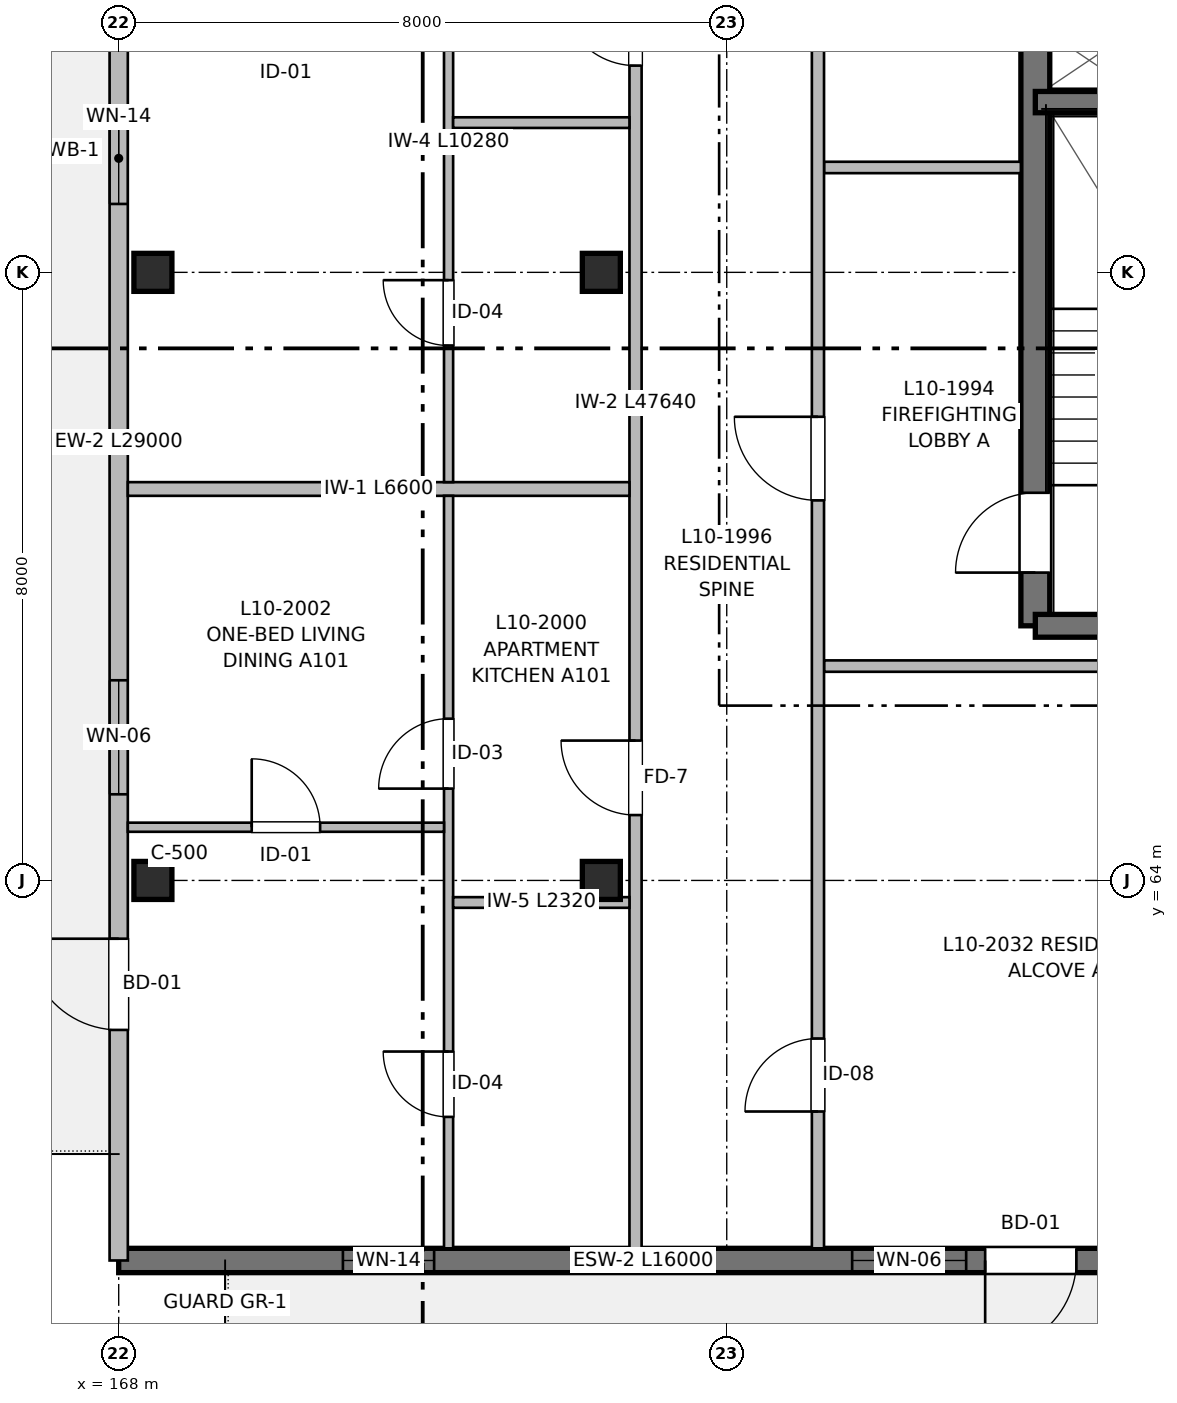
"""IFC4 building model, lengths in metres.
Left out: names, types, materials, properties, quantities, classifications, styles, units other than length and angle.
Written with IfcOpenShell. Run it as: python <this file> out.ifc"""

import sys

from ifc_helpers import new_model, si_unit, direction, frame, frame_2d, origin, origin_2d, place, context, subcontext, project, spatial, rectangle, extrude, element, fill, save


model = new_model("IFC4")
c1 = context("Model", 3, precision=1e-05, world=origin(), true_north=direction((0.0, 1.0)))
c2 = subcontext(c1, "Body", "Model", "MODEL_VIEW")
j1 = project(units=[si_unit("LENGTHUNIT", "METRE"), si_unit("PLANEANGLEUNIT", "RADIAN")], contexts=[c1])
p1 = place(None, origin())
s1 = spatial("IfcSite", under=j1, at=p1, CompositionType="ELEMENT")
p2 = place(p1, origin())
s2 = spatial("IfcBuilding", under=s1, at=p2, CompositionType="ELEMENT")
p3 = place(p2, frame((0.0, 0.0, 32.96)))
s3 = spatial("IfcBuildingStorey", under=s2, at=p3, CompositionType="ELEMENT", Elevation=32.96)
for number, where, z_axis, x_axis in (
    (1, (168.45, 64.0, 0.0), (0.0, 0.0, 1.0), (1.0, 0.0, 0.0)),
    (2, (168.45, 72.0, 0.0), (0.0, 0.0, 1.0), (1.0, 0.0, 0.0)),
    (3, (174.35, 64.0, 0.0), (0.0, 0.0, 1.0), (1.0, 0.0, 0.0)),
    (4, (174.35, 72.0, 0.0), (0.0, 0.0, 1.0), (1.0, 0.0, 0.0)),
):
    element("IfcColumn", number, at=place(p3, frame(where, z_axis=z_axis, x_axis=x_axis)), inside=s3, PredefinedType="COLUMN", context=c2, shape_type="SweptSolid", body=[
        extrude(rectangle(XDim=0.5, YDim=0.5, at=origin_2d()), origin(), (0.0, 0.0, 1.0), 3.2),
    ])
p4 = place(p3, frame((180.06, 67.35, 0.0), z_axis=(0.0, 0.0, 1.0), x_axis=(0.0, 1.0, 0.0)))
e5 = element("IfcWall", 5, at=p4, inside=s3, PredefinedType="SHEAR", context=c2, shape_type="SweptSolid", body=[
    extrude(rectangle(XDim=13.15, YDim=0.38, at=frame_2d((6.575, 0.0))), origin(), (0.0, 0.0, 1.0), 3.2),
])
p5 = place(p4, frame((0.7, 0.0, 0.0)))
e6 = element("IfcOpeningElement", 6, at=p5, cuts=e5, PredefinedType="OPENING", context=c2, shape_type="SweptSolid", body=[
    extrude(rectangle(XDim=1.05, YDim=2.15, at=frame_2d((0.525, 1.075))), frame((0.0, 0.2, 0.0), z_axis=(0.0, -1.0, 0.0), x_axis=(1.0, 0.0, 0.0)), (0.0, 0.0, 1.0), 0.4),
])
p6 = place(p3, frame((183.47, 67.35, 0.0), z_axis=(0.0, 0.0, 1.0), x_axis=(-1.0, 0.0, 0.0)))
e7 = element("IfcWall", 7, at=p6, inside=s3, PredefinedType="SHEAR", context=c2, shape_type="SweptSolid", body=[
    extrude(rectangle(XDim=3.41, YDim=0.3, at=frame_2d((1.705, 0.0))), origin(), (0.0, 0.0, 1.0), 3.2),
])
p7 = place(p3, frame((180.06, 74.24, 0.0), z_axis=(0.0, 0.0, 1.0), x_axis=(1.0, 0.0, 0.0)))
e8 = element("IfcWall", 8, at=p7, inside=s3, PredefinedType="SHEAR", context=c2, shape_type="SweptSolid", body=[
    extrude(rectangle(XDim=3.41, YDim=0.28, at=frame_2d((1.705, 0.0))), origin(), (0.0, 0.0, 1.0), 3.2),
])
p8 = place(p3, frame((184.0, 59.0, 0.0), z_axis=(0.0, 0.0, 1.0), x_axis=(-1.0, 0.0, 0.0)))
e9 = element("IfcWall", 9, at=p8, inside=s3, PredefinedType="SHEAR", context=c2, shape_type="SweptSolid", body=[
    extrude(rectangle(XDim=16.0, YDim=0.32, at=frame_2d((8.0, 0.0))), origin(), (0.0, 0.0, 1.0), 2.98),
])
p9 = place(p8, frame((3.4, 0.0, 0.0)))
e10 = element("IfcOpeningElement", 10, at=p9, cuts=e9, PredefinedType="OPENING", context=c2, shape_type="SweptSolid", body=[
    extrude(rectangle(XDim=1.2, YDim=2.2, at=frame_2d((0.6, 1.1))), frame((0.0, 0.17, 0.0), z_axis=(0.0, -1.0, 0.0), x_axis=(1.0, 0.0, 0.0)), (0.0, 0.0, 1.0), 0.34),
])
p10 = place(p8, frame((4.85, 0.0, 0.82)))
e11 = element("IfcOpeningElement", 11, at=p10, cuts=e9, PredefinedType="OPENING", context=c2, shape_type="SweptSolid", body=[
    extrude(rectangle(XDim=1.5, YDim=1.4, at=frame_2d((0.75, 0.7))), frame((0.0, 0.17, 0.0), z_axis=(0.0, -1.0, 0.0), x_axis=(1.0, 0.0, 0.0)), (0.0, 0.0, 1.0), 0.34),
])
p11 = place(p8, frame((11.85, 0.0, 0.9)))
e12 = element("IfcOpeningElement", 12, at=p11, cuts=e9, PredefinedType="OPENING", context=c2, shape_type="SweptSolid", body=[
    extrude(rectangle(XDim=1.2, YDim=1.05, at=frame_2d((0.6, 0.525))), frame((0.0, 0.17, 0.0), z_axis=(0.0, -1.0, 0.0), x_axis=(1.0, 0.0, 0.0)), (0.0, 0.0, 1.0), 0.34),
])
p12 = place(p3, frame((168.0, 59.0, 0.0), z_axis=(0.0, 0.0, 1.0), x_axis=(0.0, 1.0, 0.0)))
e13 = element("IfcWall", 13, at=p12, inside=s3, PredefinedType="SOLIDWALL", context=c2, shape_type="SweptSolid", body=[
    extrude(rectangle(XDim=29.0, YDim=0.24, at=frame_2d((14.5, 0.0))), origin(), (0.0, 0.0, 1.0), 2.98),
])
p13 = place(p12, frame((3.033, 0.0, 0.0)))
e14 = element("IfcOpeningElement", 14, at=p13, cuts=e13, PredefinedType="OPENING", context=c2, shape_type="SweptSolid", body=[
    extrude(rectangle(XDim=1.2, YDim=2.2, at=frame_2d((0.6, 1.1))), frame((0.0, 0.13, 0.0), z_axis=(0.0, -1.0, 0.0), x_axis=(1.0, 0.0, 0.0)), (0.0, 0.0, 1.0), 0.26),
])
p14 = place(p12, frame((6.133, 0.0, 0.82)))
e15 = element("IfcOpeningElement", 15, at=p14, cuts=e13, PredefinedType="OPENING", context=c2, shape_type="SweptSolid", body=[
    extrude(rectangle(XDim=1.5, YDim=1.4, at=frame_2d((0.75, 0.7))), frame((0.0, 0.13, 0.0), z_axis=(0.0, -1.0, 0.0), x_axis=(1.0, 0.0, 0.0)), (0.0, 0.0, 1.0), 0.26),
])
p15 = place(p12, frame((13.9, 0.0, 0.9)))
e16 = element("IfcOpeningElement", 16, at=p15, cuts=e13, PredefinedType="OPENING", context=c2, shape_type="SweptSolid", body=[
    extrude(rectangle(XDim=1.2, YDim=1.05, at=frame_2d((0.6, 0.525))), frame((0.0, 0.13, 0.0), z_axis=(0.0, -1.0, 0.0), x_axis=(1.0, 0.0, 0.0)), (0.0, 0.0, 1.0), 0.26),
])
p16 = place(p12, frame((23.842, 0.0, 0.9)))
e17 = element("IfcOpeningElement", 17, at=p16, cuts=e13, PredefinedType="OPENING", context=c2, shape_type="SweptSolid", body=[
    extrude(rectangle(XDim=0.65, YDim=0.95, at=frame_2d((0.325, 0.475))), frame((0.0, 0.13, 0.0), z_axis=(0.0, -1.0, 0.0), x_axis=(1.0, 0.0, 0.0)), (0.0, 0.0, 1.0), 0.26),
])
p17 = place(p12, frame((17.535, 0.0, 0.82)))
e18 = element("IfcOpeningElement", 18, at=p17, cuts=e13, PredefinedType="OPENING", context=c2, shape_type="SweptSolid", body=[
    extrude(rectangle(XDim=1.5, YDim=1.4, at=frame_2d((0.75, 0.7))), frame((0.0, 0.13, 0.0), z_axis=(0.0, -1.0, 0.0), x_axis=(1.0, 0.0, 0.0)), (0.0, 0.0, 1.0), 0.26),
])
p18 = place(p12, frame((27.875, 0.0, 0.9)))
e19 = element("IfcOpeningElement", 19, at=p18, cuts=e13, PredefinedType="OPENING", context=c2, shape_type="SweptSolid", body=[
    extrude(rectangle(XDim=0.65, YDim=0.95, at=frame_2d((0.325, 0.475))), frame((0.0, 0.13, 0.0), z_axis=(0.0, -1.0, 0.0), x_axis=(1.0, 0.0, 0.0)), (0.0, 0.0, 1.0), 0.26),
])
p19 = place(p3, frame((177.28, 66.82, 0.0), z_axis=(0.0, 0.0, 1.0), x_axis=(1.0, 0.0, 0.0)))
e20 = element("IfcWall", 20, at=p19, inside=s3, PredefinedType="PARTITIONING", context=c2, shape_type="SweptSolid", body=[
    extrude(rectangle(XDim=6.6, YDim=0.15, at=frame_2d((3.3, 0.0))), origin(), (0.0, 0.0, 1.0), 2.935),
])
p20 = place(p3, frame((177.28, 73.38, 0.0), z_axis=(0.0, 0.0, 1.0), x_axis=(1.0, 0.0, 0.0)))
e21 = element("IfcWall", 21, at=p20, inside=s3, PredefinedType="PARTITIONING", context=c2, shape_type="SweptSolid", body=[
    extrude(rectangle(XDim=2.59, YDim=0.15, at=frame_2d((1.295, 0.0))), origin(), (0.0, 0.0, 1.0), 2.935),
])
p21 = place(p3, frame((174.8, 59.16, 0.0), z_axis=(0.0, 0.0, 1.0), x_axis=(0.0, 1.0, 0.0)))
e22 = element("IfcWall", 22, at=p21, inside=s3, PredefinedType="PARTITIONING", context=c2, shape_type="SweptSolid", body=[
    extrude(rectangle(XDim=47.64, YDim=0.16, at=frame_2d((23.82, 0.0))), origin(), (0.0, 0.0, 1.0), 2.935),
])
p22 = place(p21, frame((5.7, 0.0, 0.0)))
e23 = element("IfcOpeningElement", 23, at=p22, cuts=e22, PredefinedType="OPENING", context=c2, shape_type="SweptSolid", body=[
    extrude(rectangle(XDim=0.98, YDim=2.15, at=frame_2d((0.49, 1.075))), frame((0.0, 0.09, 0.0), z_axis=(0.0, -1.0, 0.0), x_axis=(1.0, 0.0, 0.0)), (0.0, 0.0, 1.0), 0.18),
])
p23 = place(p21, frame((15.56, 0.0, 0.0)))
e24 = element("IfcOpeningElement", 24, at=p23, cuts=e22, PredefinedType="OPENING", context=c2, shape_type="SweptSolid", body=[
    extrude(rectangle(XDim=0.98, YDim=2.15, at=frame_2d((0.49, 1.075))), frame((0.0, 0.09, 0.0), z_axis=(0.0, -1.0, 0.0), x_axis=(1.0, 0.0, 0.0)), (0.0, 0.0, 1.0), 0.18),
])
p24 = place(p21, frame((26.9, 0.0, 0.0)))
e25 = element("IfcOpeningElement", 25, at=p24, cuts=e22, PredefinedType="OPENING", context=c2, shape_type="SweptSolid", body=[
    extrude(rectangle(XDim=0.98, YDim=2.15, at=frame_2d((0.49, 1.075))), frame((0.0, 0.09, 0.0), z_axis=(0.0, -1.0, 0.0), x_axis=(1.0, 0.0, 0.0)), (0.0, 0.0, 1.0), 0.18),
])
p25 = place(p21, frame((40.4, 0.0, 0.0)))
e26 = element("IfcOpeningElement", 26, at=p25, cuts=e22, PredefinedType="OPENING", context=c2, shape_type="SweptSolid", body=[
    extrude(rectangle(XDim=0.98, YDim=2.15, at=frame_2d((0.49, 1.075))), frame((0.0, 0.09, 0.0), z_axis=(0.0, -1.0, 0.0), x_axis=(1.0, 0.0, 0.0)), (0.0, 0.0, 1.0), 0.18),
])
p26 = place(p3, frame((177.2, 59.16, 0.0), z_axis=(0.0, 0.0, 1.0), x_axis=(0.0, 1.0, 0.0)))
e27 = element("IfcWall", 27, at=p26, inside=s3, PredefinedType="PARTITIONING", context=c2, shape_type="SweptSolid", body=[
    extrude(rectangle(XDim=47.64, YDim=0.16, at=frame_2d((23.82, 0.0))), origin(), (0.0, 0.0, 1.0), 2.935),
])
p27 = place(p26, frame((9.84, 0.0, 0.0)))
e28 = element("IfcOpeningElement", 28, at=p27, cuts=e27, PredefinedType="OPENING", context=c2, shape_type="SweptSolid", body=[
    extrude(rectangle(XDim=1.1, YDim=2.15, at=frame_2d((0.55, 1.075))), frame((0.0, 0.09, 0.0), z_axis=(0.0, -1.0, 0.0), x_axis=(1.0, 0.0, 0.0)), (0.0, 0.0, 1.0), 0.18),
])
p28 = place(p26, frame((16.24, 0.0, 0.0)))
e29 = element("IfcOpeningElement", 29, at=p28, cuts=e27, PredefinedType="OPENING", context=c2, shape_type="SweptSolid", body=[
    extrude(rectangle(XDim=1.6, YDim=2.15, at=frame_2d((0.8, 1.075))), frame((0.0, 0.09, 0.0), z_axis=(0.0, -1.0, 0.0), x_axis=(1.0, 0.0, 0.0)), (0.0, 0.0, 1.0), 0.18),
])
p29 = place(p26, frame((1.8, 0.0, 0.0)))
e30 = element("IfcOpeningElement", 30, at=p29, cuts=e27, PredefinedType="OPENING", context=c2, shape_type="SweptSolid", body=[
    extrude(rectangle(XDim=0.96, YDim=2.15, at=frame_2d((0.48, 1.075))), frame((0.0, 0.09, 0.0), z_axis=(0.0, -1.0, 0.0), x_axis=(1.0, 0.0, 0.0)), (0.0, 0.0, 1.0), 0.18),
])
p30 = place(p26, frame((29.87, 0.0, 0.0)))
e31 = element("IfcOpeningElement", 31, at=p30, cuts=e27, PredefinedType="OPENING", context=c2, shape_type="SweptSolid", body=[
    extrude(rectangle(XDim=0.98, YDim=2.15, at=frame_2d((0.49, 1.075))), frame((0.0, 0.09, 0.0), z_axis=(0.0, -1.0, 0.0), x_axis=(1.0, 0.0, 0.0)), (0.0, 0.0, 1.0), 0.18),
])
p31 = place(p26, frame((38.13, 0.0, 0.0)))
e32 = element("IfcOpeningElement", 32, at=p31, cuts=e27, PredefinedType="OPENING", context=c2, shape_type="SweptSolid", body=[
    extrude(rectangle(XDim=0.98, YDim=2.15, at=frame_2d((0.49, 1.075))), frame((0.0, 0.09, 0.0), z_axis=(0.0, -1.0, 0.0), x_axis=(1.0, 0.0, 0.0)), (0.0, 0.0, 1.0), 0.18),
])
p32 = place(p3, frame((168.12, 69.15, 0.0), z_axis=(0.0, 0.0, 1.0), x_axis=(1.0, 0.0, 0.0)))
e33 = element("IfcWall", 33, at=p32, inside=s3, PredefinedType="PARTITIONING", context=c2, shape_type="SweptSolid", body=[
    extrude(rectangle(XDim=6.6, YDim=0.18, at=frame_2d((3.3, 0.0))), origin(), (0.0, 0.0, 1.0), 2.935),
])
p33 = place(p3, frame((172.34, 59.16, 0.0), z_axis=(0.0, 0.0, 1.0), x_axis=(0.0, 1.0, 0.0)))
e34 = element("IfcWall", 34, at=p33, inside=s3, PredefinedType="PARTITIONING", context=c2, shape_type="SweptSolid", body=[
    extrude(rectangle(XDim=9.9, YDim=0.12, at=frame_2d((4.95, 0.0))), origin(), (0.0, 0.0, 1.0), 2.935),
])
p34 = place(p33, frame((1.729, 0.0, 0.0)))
e35 = element("IfcOpeningElement", 35, at=p34, cuts=e34, PredefinedType="OPENING", context=c2, shape_type="SweptSolid", body=[
    extrude(rectangle(XDim=0.86, YDim=2.1, at=frame_2d((0.43, 1.05))), frame((0.0, 0.07, 0.0), z_axis=(0.0, -1.0, 0.0), x_axis=(1.0, 0.0, 0.0)), (0.0, 0.0, 1.0), 0.14),
])
p35 = place(p33, frame((6.048, 0.0, 0.0)))
e36 = element("IfcOpeningElement", 36, at=p35, cuts=e34, PredefinedType="OPENING", context=c2, shape_type="SweptSolid", body=[
    extrude(rectangle(XDim=0.92, YDim=2.1, at=frame_2d((0.46, 1.05))), frame((0.0, 0.07, 0.0), z_axis=(0.0, -1.0, 0.0), x_axis=(1.0, 0.0, 0.0)), (0.0, 0.0, 1.0), 0.14),
])
p36 = place(p3, frame((172.4, 63.71, 0.0), z_axis=(0.0, 0.0, 1.0), x_axis=(1.0, 0.0, 0.0)))
e37 = element("IfcWall", 37, at=p36, inside=s3, PredefinedType="PARTITIONING", context=c2, shape_type="SweptSolid", body=[
    extrude(rectangle(XDim=2.32, YDim=0.14, at=frame_2d((1.16, 0.0))), origin(), (0.0, 0.0, 1.0), 2.935),
])
p37 = place(p3, frame((168.12, 64.7, 0.0), z_axis=(0.0, 0.0, 1.0), x_axis=(1.0, 0.0, 0.0)))
e38 = element("IfcWall", 38, at=p37, inside=s3, PredefinedType="PARTITIONING", context=c2, shape_type="SweptSolid", body=[
    extrude(rectangle(XDim=4.16, YDim=0.12, at=frame_2d((2.08, 0.0))), origin(), (0.0, 0.0, 1.0), 2.935),
])
p38 = place(p37, frame((1.63, 0.0, 0.0)))
e39 = element("IfcOpeningElement", 39, at=p38, cuts=e38, PredefinedType="OPENING", context=c2, shape_type="SweptSolid", body=[
    extrude(rectangle(XDim=0.9, YDim=2.1, at=frame_2d((0.45, 1.05))), frame((0.0, 0.07, 0.0), z_axis=(0.0, -1.0, 0.0), x_axis=(1.0, 0.0, 0.0)), (0.0, 0.0, 1.0), 0.14),
])
p39 = place(p3, frame((172.34, 69.24, 0.0), z_axis=(0.0, 0.0, 1.0), x_axis=(0.0, 1.0, 0.0)))
e40 = element("IfcWall", 40, at=p39, inside=s3, PredefinedType="PARTITIONING", context=c2, shape_type="SweptSolid", body=[
    extrude(rectangle(XDim=10.28, YDim=0.12, at=frame_2d((5.14, 0.0))), origin(), (0.0, 0.0, 1.0), 2.935),
])
p40 = place(p39, frame((1.797, 0.0, 0.0)))
e41 = element("IfcOpeningElement", 41, at=p40, cuts=e40, PredefinedType="OPENING", context=c2, shape_type="SweptSolid", body=[
    extrude(rectangle(XDim=0.86, YDim=2.1, at=frame_2d((0.43, 1.05))), frame((0.0, 0.07, 0.0), z_axis=(0.0, -1.0, 0.0), x_axis=(1.0, 0.0, 0.0)), (0.0, 0.0, 1.0), 0.14),
])
p41 = place(p39, frame((6.284, 0.0, 0.0)))
e42 = element("IfcOpeningElement", 42, at=p41, cuts=e40, PredefinedType="OPENING", context=c2, shape_type="SweptSolid", body=[
    extrude(rectangle(XDim=0.92, YDim=2.1, at=frame_2d((0.46, 1.05))), frame((0.0, 0.07, 0.0), z_axis=(0.0, -1.0, 0.0), x_axis=(1.0, 0.0, 0.0)), (0.0, 0.0, 1.0), 0.14),
])
p42 = place(p3, frame((172.4, 73.97, 0.0), z_axis=(0.0, 0.0, 1.0), x_axis=(1.0, 0.0, 0.0)))
e43 = element("IfcWall", 43, at=p42, inside=s3, PredefinedType="PARTITIONING", context=c2, shape_type="SweptSolid", body=[
    extrude(rectangle(XDim=2.32, YDim=0.14, at=frame_2d((1.16, 0.0))), origin(), (0.0, 0.0, 1.0), 2.935),
])
p43 = place(p5, origin())
e44 = element("IfcDoor", 44, at=p43, inside=s3, OperationType="SINGLE_SWING_LEFT", PredefinedType="DOOR", context=c2, shape_type="SweptSolid", body=[
    extrude(rectangle(XDim=1.05, YDim=2.15, at=frame_2d((0.525, 1.075))), frame((0.0, 0.025, 0.0), z_axis=(0.0, -1.0, 0.0), x_axis=(1.0, 0.0, 0.0)), (0.0, 0.0, 1.0), 0.05),
])
fill(e6, e44)
p44 = place(p9, origin())
e45 = element("IfcDoor", 45, at=p44, inside=s3, OperationType="SINGLE_SWING_RIGHT", PredefinedType="DOOR", context=c2, shape_type="SweptSolid", body=[
    extrude(rectangle(XDim=1.2, YDim=2.2, at=frame_2d((0.6, 1.1))), frame((0.0, 0.025, 0.0), z_axis=(0.0, -1.0, 0.0), x_axis=(1.0, 0.0, 0.0)), (0.0, 0.0, 1.0), 0.05),
])
fill(e10, e45)
p45 = place(p10, origin())
e46 = element("IfcWindow", 46, at=p45, inside=s3, PartitioningType="SINGLE_PANEL", PredefinedType="WINDOW", context=c2, shape_type="SweptSolid", body=[
    extrude(rectangle(XDim=1.5, YDim=1.4, at=frame_2d((0.75, 0.7))), frame((0.0, 0.03, 0.0), z_axis=(0.0, -1.0, 0.0), x_axis=(1.0, 0.0, 0.0)), (0.0, 0.0, 1.0), 0.06),
])
fill(e11, e46)
p46 = place(p11, origin())
e47 = element("IfcWindow", 47, at=p46, inside=s3, PartitioningType="SINGLE_PANEL", PredefinedType="WINDOW", context=c2, shape_type="SweptSolid", body=[
    extrude(rectangle(XDim=1.2, YDim=1.05, at=frame_2d((0.6, 0.525))), frame((0.0, 0.03, 0.0), z_axis=(0.0, -1.0, 0.0), x_axis=(1.0, 0.0, 0.0)), (0.0, 0.0, 1.0), 0.06),
])
fill(e12, e47)
p47 = place(p13, origin())
e48 = element("IfcDoor", 48, at=p47, inside=s3, OperationType="SINGLE_SWING_RIGHT", PredefinedType="DOOR", context=c2, shape_type="SweptSolid", body=[
    extrude(rectangle(XDim=1.2, YDim=2.2, at=frame_2d((0.6, 1.1))), frame((0.0, 0.025, 0.0), z_axis=(0.0, -1.0, 0.0), x_axis=(1.0, 0.0, 0.0)), (0.0, 0.0, 1.0), 0.05),
])
fill(e14, e48)
p48 = place(p14, origin())
e49 = element("IfcWindow", 49, at=p48, inside=s3, PartitioningType="SINGLE_PANEL", PredefinedType="WINDOW", context=c2, shape_type="SweptSolid", body=[
    extrude(rectangle(XDim=1.5, YDim=1.4, at=frame_2d((0.75, 0.7))), frame((0.0, 0.03, 0.0), z_axis=(0.0, -1.0, 0.0), x_axis=(1.0, 0.0, 0.0)), (0.0, 0.0, 1.0), 0.06),
])
fill(e15, e49)
p49 = place(p15, origin())
e50 = element("IfcWindow", 50, at=p49, inside=s3, PartitioningType="SINGLE_PANEL", PredefinedType="WINDOW", context=c2, shape_type="SweptSolid", body=[
    extrude(rectangle(XDim=1.2, YDim=1.05, at=frame_2d((0.6, 0.525))), frame((0.0, 0.03, 0.0), z_axis=(0.0, -1.0, 0.0), x_axis=(1.0, 0.0, 0.0)), (0.0, 0.0, 1.0), 0.06),
])
fill(e16, e50)
p50 = place(p27, origin())
e51 = element("IfcDoor", 51, at=p50, inside=s3, OperationType="SINGLE_SWING_RIGHT", PredefinedType="DOOR", context=c2, shape_type="SweptSolid", body=[
    extrude(rectangle(XDim=1.1, YDim=2.15, at=frame_2d((0.55, 1.075))), frame((0.0, 0.025, 0.0), z_axis=(0.0, -1.0, 0.0), x_axis=(1.0, 0.0, 0.0)), (0.0, 0.0, 1.0), 0.05),
])
fill(e28, e51)
p51 = place(p34, origin())
e52 = element("IfcDoor", 52, at=p51, inside=s3, OperationType="SINGLE_SWING_RIGHT", PredefinedType="DOOR", context=c2, shape_type="SweptSolid", body=[
    extrude(rectangle(XDim=0.86, YDim=2.1, at=frame_2d((0.43, 1.05))), frame((0.0, 0.025, 0.0), z_axis=(0.0, -1.0, 0.0), x_axis=(1.0, 0.0, 0.0)), (0.0, 0.0, 1.0), 0.05),
])
fill(e35, e52)
p52 = place(p35, origin())
e53 = element("IfcDoor", 53, at=p52, inside=s3, OperationType="SINGLE_SWING_LEFT", PredefinedType="DOOR", context=c2, shape_type="SweptSolid", body=[
    extrude(rectangle(XDim=0.92, YDim=2.1, at=frame_2d((0.46, 1.05))), frame((0.0, 0.025, 0.0), z_axis=(0.0, -1.0, 0.0), x_axis=(1.0, 0.0, 0.0)), (0.0, 0.0, 1.0), 0.05),
])
fill(e36, e53)
p53 = place(p22, origin())
e54 = element("IfcDoor", 54, at=p53, inside=s3, OperationType="SINGLE_SWING_RIGHT", PredefinedType="DOOR", context=c2, shape_type="SweptSolid", body=[
    extrude(rectangle(XDim=0.98, YDim=2.15, at=frame_2d((0.49, 1.075))), frame((0.0, 0.025, 0.0), z_axis=(0.0, -1.0, 0.0), x_axis=(1.0, 0.0, 0.0)), (0.0, 0.0, 1.0), 0.05),
])
fill(e23, e54)
p54 = place(p38, origin())
e55 = element("IfcDoor", 55, at=p54, inside=s3, OperationType="SINGLE_SWING_LEFT", PredefinedType="DOOR", context=c2, shape_type="SweptSolid", body=[
    extrude(rectangle(XDim=0.9, YDim=2.1, at=frame_2d((0.45, 1.05))), frame((0.0, 0.025, 0.0), z_axis=(0.0, -1.0, 0.0), x_axis=(1.0, 0.0, 0.0)), (0.0, 0.0, 1.0), 0.05),
])
fill(e39, e55)
p55 = place(p40, origin())
e56 = element("IfcDoor", 56, at=p55, inside=s3, OperationType="SINGLE_SWING_RIGHT", PredefinedType="DOOR", context=c2, shape_type="SweptSolid", body=[
    extrude(rectangle(XDim=0.86, YDim=2.1, at=frame_2d((0.43, 1.05))), frame((0.0, 0.025, 0.0), z_axis=(0.0, -1.0, 0.0), x_axis=(1.0, 0.0, 0.0)), (0.0, 0.0, 1.0), 0.05),
])
fill(e41, e56)
p56 = place(p23, origin())
e57 = element("IfcDoor", 57, at=p56, inside=s3, OperationType="SINGLE_SWING_RIGHT", PredefinedType="DOOR", context=c2, shape_type="SweptSolid", body=[
    extrude(rectangle(XDim=0.98, YDim=2.15, at=frame_2d((0.49, 1.075))), frame((0.0, 0.025, 0.0), z_axis=(0.0, -1.0, 0.0), x_axis=(1.0, 0.0, 0.0)), (0.0, 0.0, 1.0), 0.05),
])
fill(e24, e57)
p57 = place(p29, origin())
e58 = element("IfcDoor", 58, at=p57, inside=s3, OperationType="SINGLE_SWING_LEFT", PredefinedType="DOOR", context=c2, shape_type="SweptSolid", body=[
    extrude(rectangle(XDim=0.96, YDim=2.15, at=frame_2d((0.48, 1.075))), frame((0.0, 0.025, 0.0), z_axis=(0.0, -1.0, 0.0), x_axis=(1.0, 0.0, 0.0)), (0.0, 0.0, 1.0), 0.05),
])
fill(e30, e58)
save(model, sys.argv[1])
